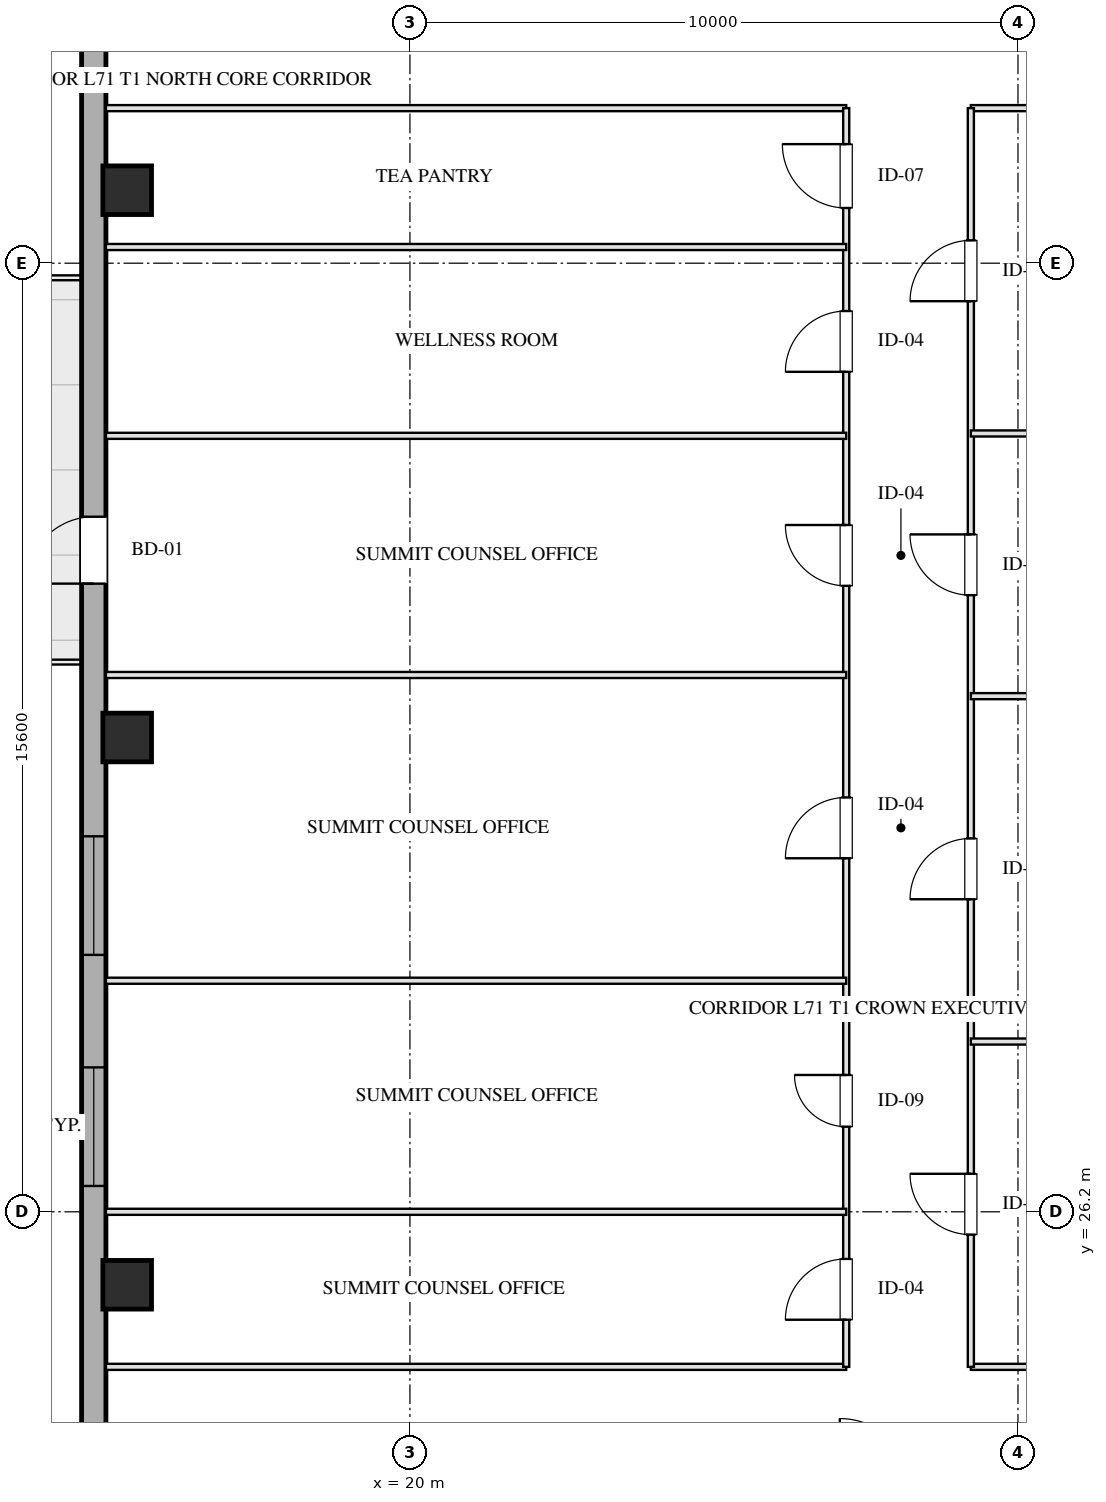
"""IFC4 building model, lengths in metres.
Left out: names, types, materials, properties, quantities, classifications, styles, units other than length and angle.
Written with IfcOpenShell. Run it as: python <this file> out.ifc"""

import sys

from ifc_helpers import new_model, si_unit, direction, frame, frame_2d, origin, origin_2d, place, context, subcontext, project, spatial, rectangle, hollow_rectangle, extrude, element, fill, save


model = new_model("IFC4")
c1 = context("Model", 3, precision=1e-05, world=origin(), true_north=direction((0.0, 1.0)))
c2 = subcontext(c1, "Body", "Model", "MODEL_VIEW")
j1 = project(units=[si_unit("LENGTHUNIT", "METRE"), si_unit("PLANEANGLEUNIT", "RADIAN")], contexts=[c1])
p1 = place(None, origin())
s1 = spatial("IfcSite", under=j1, at=p1, CompositionType="ELEMENT")
p2 = place(p1, origin())
s2 = spatial("IfcBuilding", under=s1, at=p2, CompositionType="ELEMENT")
p3 = place(p2, frame((0.0, 0.0, 260.0)))
s3 = spatial("IfcBuildingStorey", under=s2, at=p3, CompositionType="ELEMENT", Elevation=260.0)
for number, where, z_axis, x_axis in (
    (1, (15.35, 25.0, 0.0), (0.0, 0.0, 1.0), (1.0, 0.0, 0.0)),
    (2, (15.35, 34.0, 0.0), (0.0, 0.0, 1.0), (1.0, 0.0, 0.0)),
    (3, (15.35, 43.0, 0.0), (0.0, 0.0, 1.0), (1.0, 0.0, 0.0)),
):
    element("IfcColumn", number, at=place(p3, frame(where, z_axis=z_axis, x_axis=x_axis)), inside=s3, PredefinedType="COLUMN", context=c2, shape_type="SweptSolid", body=[
        extrude(hollow_rectangle(XDim=0.8, YDim=0.8, WallThickness=0.028, at=origin_2d()), origin(), (0.0, 0.0, 1.0), 3.201),
    ])
p4 = place(p3, frame((14.8, 13.1, 0.0), z_axis=(0.0, 0.0, 1.0), x_axis=(0.0, 1.0, 0.0)))
e4 = element("IfcWall", 4, at=p4, inside=s3, PredefinedType="SOLIDWALL", context=c2, shape_type="SweptSolid", body=[
    extrude(rectangle(XDim=41.8, YDim=0.4, at=frame_2d((20.9, 0.0))), origin(), (0.0, 0.0, 1.0), 2.36),
])
p5 = place(p4, frame((13.525, 0.0, 0.75)))
e5 = element("IfcOpeningElement", 5, at=p5, cuts=e4, PredefinedType="OPENING", context=c2, shape_type="SweptSolid", body=[
    extrude(rectangle(XDim=1.95, YDim=1.21, at=frame_2d((0.975, 0.605))), frame((0.0, 0.21, 0.0), z_axis=(0.0, -1.0, 0.0), x_axis=(1.0, 0.0, 0.0)), (0.0, 0.0, 1.0), 0.42),
])
p6 = place(p4, frame((17.325, 0.0, 0.75)))
e6 = element("IfcOpeningElement", 6, at=p6, cuts=e4, PredefinedType="OPENING", context=c2, shape_type="SweptSolid", body=[
    extrude(rectangle(XDim=1.95, YDim=1.21, at=frame_2d((0.975, 0.605))), frame((0.0, 0.21, 0.0), z_axis=(0.0, -1.0, 0.0), x_axis=(1.0, 0.0, 0.0)), (0.0, 0.0, 1.0), 0.42),
])
p7 = place(p4, frame((23.43, 0.0, 0.0)))
e7 = element("IfcOpeningElement", 7, at=p7, cuts=e4, PredefinedType="OPENING", context=c2, shape_type="SweptSolid", body=[
    extrude(rectangle(XDim=1.1, YDim=2.15, at=frame_2d((0.55, 1.075))), frame((0.0, 0.21, 0.0), z_axis=(0.0, -1.0, 0.0), x_axis=(1.0, 0.0, 0.0)), (0.0, 0.0, 1.0), 0.42),
])
p8 = place(p3, frame((15.0, 23.65, 0.0), z_axis=(0.0, 0.0, 1.0), x_axis=(1.0, 0.0, 0.0)))
e8 = element("IfcWall", 8, at=p8, inside=s3, PredefinedType="MOVABLE", context=c2, shape_type="SweptSolid", body=[
    extrude(rectangle(XDim=12.175, YDim=0.1, at=frame_2d((6.087, 0.0))), origin(), (0.0, 0.0, 1.0), 2.925),
])
p9 = place(p3, frame((29.225, 23.65, 0.0), z_axis=(0.0, 0.0, 1.0), x_axis=(1.0, 0.0, 0.0)))
e9 = element("IfcWall", 9, at=p9, inside=s3, PredefinedType="MOVABLE", context=c2, shape_type="SweptSolid", body=[
    extrude(rectangle(XDim=15.775, YDim=0.1, at=frame_2d((7.887, 0.0))), origin(), (0.0, 0.0, 1.0), 2.925),
])
p10 = place(p3, frame((15.0, 44.35, 0.0), z_axis=(0.0, 0.0, 1.0), x_axis=(1.0, 0.0, 0.0)))
e10 = element("IfcWall", 10, at=p10, inside=s3, PredefinedType="MOVABLE", context=c2, shape_type="SweptSolid", body=[
    extrude(rectangle(XDim=12.175, YDim=0.1, at=frame_2d((6.087, 0.0))), origin(), (0.0, 0.0, 1.0), 2.925),
])
p11 = place(p3, frame((29.225, 44.35, 0.0), z_axis=(0.0, 0.0, 1.0), x_axis=(1.0, 0.0, 0.0)))
e11 = element("IfcWall", 11, at=p11, inside=s3, PredefinedType="MOVABLE", context=c2, shape_type="SweptSolid", body=[
    extrude(rectangle(XDim=15.775, YDim=0.1, at=frame_2d((7.887, 0.0))), origin(), (0.0, 0.0, 1.0), 2.925),
])
p12 = place(p3, frame((27.175, 23.65, 0.0), z_axis=(0.0, 0.0, 1.0), x_axis=(0.0, 1.0, 0.0)))
e12 = element("IfcWall", 12, at=p12, inside=s3, PredefinedType="MOVABLE", context=c2, shape_type="SweptSolid", body=[
    extrude(rectangle(XDim=20.7, YDim=0.1, at=frame_2d((10.35, 0.0))), origin(), (0.0, 0.0, 1.0), 2.925),
])
p13 = place(p12, frame((0.775, 0.0, 0.0)))
e13 = element("IfcOpeningElement", 13, at=p13, cuts=e12, PredefinedType="OPENING", context=c2, shape_type="SweptSolid", body=[
    extrude(rectangle(XDim=1.0, YDim=2.05, at=frame_2d((0.5, 1.025))), frame((0.0, 0.06, 0.0), z_axis=(0.0, -1.0, 0.0), x_axis=(1.0, 0.0, 0.0)), (0.0, 0.0, 1.0), 0.12),
])
p14 = place(p12, frame((3.95, 0.0, 0.0)))
e14 = element("IfcOpeningElement", 14, at=p14, cuts=e12, PredefinedType="OPENING", context=c2, shape_type="SweptSolid", body=[
    extrude(rectangle(XDim=0.85, YDim=2.05, at=frame_2d((0.425, 1.025))), frame((0.0, 0.06, 0.0), z_axis=(0.0, -1.0, 0.0), x_axis=(1.0, 0.0, 0.0)), (0.0, 0.0, 1.0), 0.12),
])
p15 = place(p12, frame((8.364, 0.0, 0.0)))
e15 = element("IfcOpeningElement", 15, at=p15, cuts=e12, PredefinedType="OPENING", context=c2, shape_type="SweptSolid", body=[
    extrude(rectangle(XDim=1.0, YDim=2.05, at=frame_2d((0.5, 1.025))), frame((0.0, 0.06, 0.0), z_axis=(0.0, -1.0, 0.0), x_axis=(1.0, 0.0, 0.0)), (0.0, 0.0, 1.0), 0.12),
])
p16 = place(p12, frame((12.844, 0.0, 0.0)))
e16 = element("IfcOpeningElement", 16, at=p16, cuts=e12, PredefinedType="OPENING", context=c2, shape_type="SweptSolid", body=[
    extrude(rectangle(XDim=1.0, YDim=2.05, at=frame_2d((0.5, 1.025))), frame((0.0, 0.06, 0.0), z_axis=(0.0, -1.0, 0.0), x_axis=(1.0, 0.0, 0.0)), (0.0, 0.0, 1.0), 0.12),
])
p17 = place(p12, frame((16.364, 0.0, 0.0)))
e17 = element("IfcOpeningElement", 17, at=p17, cuts=e12, PredefinedType="OPENING", context=c2, shape_type="SweptSolid", body=[
    extrude(rectangle(XDim=1.0, YDim=2.05, at=frame_2d((0.5, 1.025))), frame((0.0, 0.06, 0.0), z_axis=(0.0, -1.0, 0.0), x_axis=(1.0, 0.0, 0.0)), (0.0, 0.0, 1.0), 0.12),
])
p18 = place(p12, frame((19.058, 0.0, 0.0)))
e18 = element("IfcOpeningElement", 18, at=p18, cuts=e12, PredefinedType="OPENING", context=c2, shape_type="SweptSolid", body=[
    extrude(rectangle(XDim=1.05, YDim=2.05, at=frame_2d((0.525, 1.025))), frame((0.0, 0.06, 0.0), z_axis=(0.0, -1.0, 0.0), x_axis=(1.0, 0.0, 0.0)), (0.0, 0.0, 1.0), 0.12),
])
p19 = place(p3, frame((29.225, 23.65, 0.0), z_axis=(0.0, 0.0, 1.0), x_axis=(0.0, 1.0, 0.0)))
e19 = element("IfcWall", 19, at=p19, inside=s3, PredefinedType="MOVABLE", context=c2, shape_type="SweptSolid", body=[
    extrude(rectangle(XDim=20.7, YDim=0.1, at=frame_2d((10.35, 0.0))), origin(), (0.0, 0.0, 1.0), 2.925),
])
p20 = place(p19, frame((2.175, 0.0, 0.0)))
e20 = element("IfcOpeningElement", 20, at=p20, cuts=e19, PredefinedType="OPENING", context=c2, shape_type="SweptSolid", body=[
    extrude(rectangle(XDim=1.0, YDim=2.05, at=frame_2d((0.5, 1.025))), frame((0.0, 0.06, 0.0), z_axis=(0.0, -1.0, 0.0), x_axis=(1.0, 0.0, 0.0)), (0.0, 0.0, 1.0), 0.12),
])
p21 = place(p19, frame((7.69, 0.0, 0.0)))
e21 = element("IfcOpeningElement", 21, at=p21, cuts=e19, PredefinedType="OPENING", context=c2, shape_type="SweptSolid", body=[
    extrude(rectangle(XDim=1.0, YDim=2.05, at=frame_2d((0.5, 1.025))), frame((0.0, 0.06, 0.0), z_axis=(0.0, -1.0, 0.0), x_axis=(1.0, 0.0, 0.0)), (0.0, 0.0, 1.0), 0.12),
])
p22 = place(p19, frame((12.69, 0.0, 0.0)))
e22 = element("IfcOpeningElement", 22, at=p22, cuts=e19, PredefinedType="OPENING", context=c2, shape_type="SweptSolid", body=[
    extrude(rectangle(XDim=1.0, YDim=2.05, at=frame_2d((0.5, 1.025))), frame((0.0, 0.06, 0.0), z_axis=(0.0, -1.0, 0.0), x_axis=(1.0, 0.0, 0.0)), (0.0, 0.0, 1.0), 0.12),
])
p23 = place(p19, frame((17.525, 0.0, 0.0)))
e23 = element("IfcOpeningElement", 23, at=p23, cuts=e19, PredefinedType="OPENING", context=c2, shape_type="SweptSolid", body=[
    extrude(rectangle(XDim=1.0, YDim=2.05, at=frame_2d((0.5, 1.025))), frame((0.0, 0.06, 0.0), z_axis=(0.0, -1.0, 0.0), x_axis=(1.0, 0.0, 0.0)), (0.0, 0.0, 1.0), 0.12),
])
for number, where, z_axis, x_axis in (
    (24, (15.0, 26.2, 0.0), (0.0, 0.0, 1.0), (1.0, 0.0, 0.0)),
    (25, (15.0, 30.0, 0.0), (0.0, 0.0, 1.0), (1.0, 0.0, 0.0)),
    (26, (15.0, 35.028, 0.0), (0.0, 0.0, 1.0), (1.0, 0.0, 0.0)),
    (27, (15.0, 38.961, 0.0), (0.0, 0.0, 1.0), (1.0, 0.0, 0.0)),
    (28, (15.0, 42.066, 0.0), (0.0, 0.0, 1.0), (1.0, 0.0, 0.0)),
):
    element("IfcWall", number, at=place(p3, frame(where, z_axis=z_axis, x_axis=x_axis)), inside=s3, PredefinedType="MOVABLE", context=c2, shape_type="SweptSolid", body=[
        extrude(rectangle(XDim=12.175, YDim=0.1, at=frame_2d((6.087, 0.0))), origin(), (0.0, 0.0, 1.0), 2.925),
    ])
for number, where, z_axis, x_axis in (
    (29, (29.225, 29.0, 0.0), (0.0, 0.0, 1.0), (1.0, 0.0, 0.0)),
    (30, (29.225, 34.68, 0.0), (0.0, 0.0, 1.0), (1.0, 0.0, 0.0)),
    (31, (29.225, 39.0, 0.0), (0.0, 0.0, 1.0), (1.0, 0.0, 0.0)),
):
    element("IfcWall", number, at=place(p3, frame(where, z_axis=z_axis, x_axis=x_axis)), inside=s3, PredefinedType="MOVABLE", context=c2, shape_type="SweptSolid", body=[
        extrude(rectangle(XDim=15.775, YDim=0.1, at=frame_2d((7.887, 0.0))), origin(), (0.0, 0.0, 1.0), 2.925),
    ])
p24 = place(p5, origin())
e32 = element("IfcWindow", 32, at=p24, inside=s3, PartitioningType="TRIPLE_PANEL_VERTICAL", PredefinedType="WINDOW", context=c2, shape_type="SweptSolid", body=[
    extrude(rectangle(XDim=1.95, YDim=1.21, at=frame_2d((0.975, 0.605))), frame((0.0, 0.03, 0.0), z_axis=(0.0, -1.0, 0.0), x_axis=(1.0, 0.0, 0.0)), (0.0, 0.0, 1.0), 0.06),
])
fill(e5, e32)
p25 = place(p6, origin())
e33 = element("IfcWindow", 33, at=p25, inside=s3, PartitioningType="TRIPLE_PANEL_VERTICAL", PredefinedType="WINDOW", context=c2, shape_type="SweptSolid", body=[
    extrude(rectangle(XDim=1.95, YDim=1.21, at=frame_2d((0.975, 0.605))), frame((0.0, 0.03, 0.0), z_axis=(0.0, -1.0, 0.0), x_axis=(1.0, 0.0, 0.0)), (0.0, 0.0, 1.0), 0.06),
])
fill(e6, e33)
p26 = place(p7, origin())
e34 = element("IfcDoor", 34, at=p26, inside=s3, OperationType="SINGLE_SWING_LEFT", PredefinedType="DOOR", context=c2, shape_type="SweptSolid", body=[
    extrude(rectangle(XDim=1.1, YDim=2.15, at=frame_2d((0.55, 1.075))), frame((0.0, 0.025, 0.0), z_axis=(0.0, -1.0, 0.0), x_axis=(1.0, 0.0, 0.0)), (0.0, 0.0, 1.0), 0.05),
])
fill(e7, e34)
p27 = place(p13, origin())
e35 = element("IfcDoor", 35, at=p27, inside=s3, OperationType="SINGLE_SWING_LEFT", PredefinedType="DOOR", context=c2, shape_type="SweptSolid", body=[
    extrude(rectangle(XDim=1.0, YDim=2.05, at=frame_2d((0.5, 1.025))), frame((0.0, 0.025, 0.0), z_axis=(0.0, -1.0, 0.0), x_axis=(1.0, 0.0, 0.0)), (0.0, 0.0, 1.0), 0.05),
])
fill(e13, e35)
p28 = place(p14, origin())
e36 = element("IfcDoor", 36, at=p28, inside=s3, OperationType="SINGLE_SWING_RIGHT", PredefinedType="DOOR", context=c2, shape_type="SweptSolid", body=[
    extrude(rectangle(XDim=0.85, YDim=2.05, at=frame_2d((0.425, 1.025))), frame((0.0, 0.025, 0.0), z_axis=(0.0, -1.0, 0.0), x_axis=(1.0, 0.0, 0.0)), (0.0, 0.0, 1.0), 0.05),
])
fill(e14, e36)
p29 = place(p15, origin())
e37 = element("IfcDoor", 37, at=p29, inside=s3, OperationType="SINGLE_SWING_LEFT", PredefinedType="DOOR", context=c2, shape_type="SweptSolid", body=[
    extrude(rectangle(XDim=1.0, YDim=2.05, at=frame_2d((0.5, 1.025))), frame((0.0, 0.025, 0.0), z_axis=(0.0, -1.0, 0.0), x_axis=(1.0, 0.0, 0.0)), (0.0, 0.0, 1.0), 0.05),
])
fill(e15, e37)
p30 = place(p16, origin())
e38 = element("IfcDoor", 38, at=p30, inside=s3, OperationType="SINGLE_SWING_RIGHT", PredefinedType="DOOR", context=c2, shape_type="SweptSolid", body=[
    extrude(rectangle(XDim=1.0, YDim=2.05, at=frame_2d((0.5, 1.025))), frame((0.0, 0.025, 0.0), z_axis=(0.0, -1.0, 0.0), x_axis=(1.0, 0.0, 0.0)), (0.0, 0.0, 1.0), 0.05),
])
fill(e16, e38)
p31 = place(p17, origin())
e39 = element("IfcDoor", 39, at=p31, inside=s3, OperationType="SINGLE_SWING_LEFT", PredefinedType="DOOR", context=c2, shape_type="SweptSolid", body=[
    extrude(rectangle(XDim=1.0, YDim=2.05, at=frame_2d((0.5, 1.025))), frame((0.0, 0.025, 0.0), z_axis=(0.0, -1.0, 0.0), x_axis=(1.0, 0.0, 0.0)), (0.0, 0.0, 1.0), 0.05),
])
fill(e17, e39)
p32 = place(p18, origin())
e40 = element("IfcDoor", 40, at=p32, inside=s3, OperationType="SINGLE_SWING_RIGHT", PredefinedType="DOOR", context=c2, shape_type="SweptSolid", body=[
    extrude(rectangle(XDim=1.05, YDim=2.05, at=frame_2d((0.525, 1.025))), frame((0.0, 0.025, 0.0), z_axis=(0.0, -1.0, 0.0), x_axis=(1.0, 0.0, 0.0)), (0.0, 0.0, 1.0), 0.05),
])
fill(e18, e40)
p33 = place(p20, origin())
e41 = element("IfcDoor", 41, at=p33, inside=s3, OperationType="SINGLE_SWING_RIGHT", PredefinedType="DOOR", context=c2, shape_type="SweptSolid", body=[
    extrude(rectangle(XDim=1.0, YDim=2.05, at=frame_2d((0.5, 1.025))), frame((0.0, 0.025, 0.0), z_axis=(0.0, -1.0, 0.0), x_axis=(1.0, 0.0, 0.0)), (0.0, 0.0, 1.0), 0.05),
])
fill(e20, e41)
p34 = place(p21, origin())
e42 = element("IfcDoor", 42, at=p34, inside=s3, OperationType="SINGLE_SWING_LEFT", PredefinedType="DOOR", context=c2, shape_type="SweptSolid", body=[
    extrude(rectangle(XDim=1.0, YDim=2.05, at=frame_2d((0.5, 1.025))), frame((0.0, 0.025, 0.0), z_axis=(0.0, -1.0, 0.0), x_axis=(1.0, 0.0, 0.0)), (0.0, 0.0, 1.0), 0.05),
])
fill(e21, e42)
p35 = place(p22, origin())
e43 = element("IfcDoor", 43, at=p35, inside=s3, OperationType="SINGLE_SWING_RIGHT", PredefinedType="DOOR", context=c2, shape_type="SweptSolid", body=[
    extrude(rectangle(XDim=1.0, YDim=2.05, at=frame_2d((0.5, 1.025))), frame((0.0, 0.025, 0.0), z_axis=(0.0, -1.0, 0.0), x_axis=(1.0, 0.0, 0.0)), (0.0, 0.0, 1.0), 0.05),
])
fill(e22, e43)
p36 = place(p23, origin())
e44 = element("IfcDoor", 44, at=p36, inside=s3, OperationType="SINGLE_SWING_LEFT", PredefinedType="DOOR", context=c2, shape_type="SweptSolid", body=[
    extrude(rectangle(XDim=1.0, YDim=2.05, at=frame_2d((0.5, 1.025))), frame((0.0, 0.025, 0.0), z_axis=(0.0, -1.0, 0.0), x_axis=(1.0, 0.0, 0.0)), (0.0, 0.0, 1.0), 0.05),
])
fill(e23, e44)
save(model, sys.argv[1])
